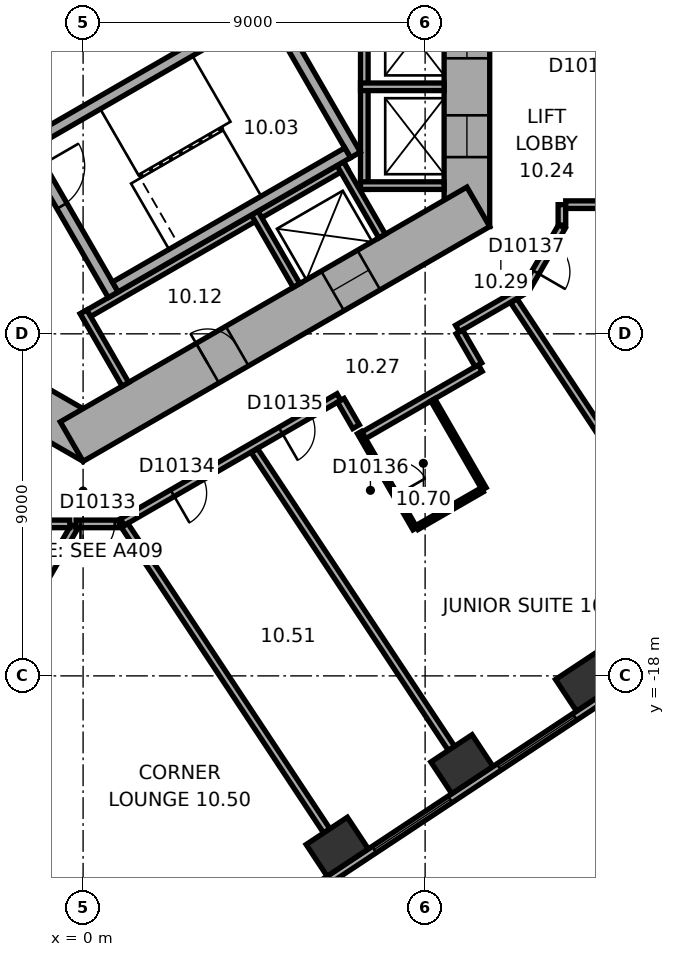
"""IFC4 building model, lengths in metres.
Left out: names, types, materials, properties, quantities, classifications, styles, units other than length and angle.
Written with IfcOpenShell. Run it as: python <this file> out.ifc"""

import sys

from ifc_helpers import new_model, si_unit, direction, frame, frame_2d, origin, origin_2d, place, context, subcontext, project, spatial, rectangle, extrude, element, fill, save


model = new_model("IFC4")
c1 = context("Model", 3, precision=1e-05, world=origin(), true_north=direction((0.0, 1.0)))
c2 = subcontext(c1, "Body", "Model", "MODEL_VIEW")
j1 = project(units=[si_unit("LENGTHUNIT", "METRE"), si_unit("PLANEANGLEUNIT", "RADIAN")], contexts=[c1])
p1 = place(None, origin())
s1 = spatial("IfcSite", under=j1, at=p1, CompositionType="ELEMENT")
p2 = place(p1, origin())
s2 = spatial("IfcBuilding", under=s1, at=p2, CompositionType="ELEMENT")
p3 = place(p2, frame((0.0, 0.0, 53.9)))
s3 = spatial("IfcBuildingStorey", under=s2, at=p3, CompositionType="ELEMENT", Elevation=53.9)
for number, where, z_axis, x_axis in (
    (1, (6.688, -22.496, 0.0), (0.0, 0.0, 1.0), (0.834, 0.552, 0.0)),
    (2, (9.969, -20.324, 0.0), (0.0, 0.0, 1.0), (0.834, 0.552, 0.0)),
    (3, (13.25, -18.152, 0.0), (0.0, 0.0, 1.0), (0.834, 0.552, 0.0)),
):
    element("IfcColumn", number, at=place(p3, frame(where, z_axis=z_axis, x_axis=x_axis)), inside=s3, PredefinedType="COLUMN", context=c2, shape_type="SweptSolid", body=[
        extrude(rectangle(XDim=1.3, YDim=1.0, at=origin_2d()), origin(), (0.0, 0.0, 1.0), 3.3),
    ])
p4 = place(p3, frame((10.1, -6.177, 0.0), z_axis=(0.0, 0.0, 1.0), x_axis=(0.0, 1.0, 0.0)))
e4 = element("IfcWall", 4, at=p4, inside=s3, PredefinedType="SHEAR", context=c2, shape_type="SweptSolid", body=[
    extrude(rectangle(XDim=12.355, YDim=1.2, at=frame_2d((6.177, 0.0))), origin(), (0.0, 0.0, 1.0), 3.3),
])
p5 = place(p4, frame((6.378, 0.0, 0.0)))
e5 = element("IfcOpeningElement", 5, at=p5, cuts=e4, PredefinedType="OPENING", context=c2, shape_type="SweptSolid", body=[
    extrude(rectangle(XDim=1.5, YDim=2.1, at=frame_2d((0.75, 1.05))), frame((0.0, 0.61, 0.0), z_axis=(0.0, -1.0, 0.0), x_axis=(1.0, 0.0, 0.0)), (0.0, 0.0, 1.0), 1.22),
])
p6 = place(p4, frame((1.828, 0.0, 0.0)))
e6 = element("IfcOpeningElement", 6, at=p6, cuts=e4, PredefinedType="OPENING", context=c2, shape_type="SweptSolid", body=[
    extrude(rectangle(XDim=1.1, YDim=2.1, at=frame_2d((0.55, 1.05))), frame((0.0, 0.61, 0.0), z_axis=(0.0, -1.0, 0.0), x_axis=(1.0, 0.0, 0.0)), (0.0, 0.0, 1.0), 1.22),
])
p7 = place(p4, frame((4.427, 0.0, 0.0)))
e7 = element("IfcOpeningElement", 7, at=p7, cuts=e4, PredefinedType="OPENING", context=c2, shape_type="SweptSolid", body=[
    extrude(rectangle(XDim=1.1, YDim=2.1, at=frame_2d((0.55, 1.05))), frame((0.0, 0.61, 0.0), z_axis=(0.0, -1.0, 0.0), x_axis=(1.0, 0.0, 0.0)), (0.0, 0.0, 1.0), 1.22),
])
p8 = place(p3, frame((-10.4, -5.658, 0.0), z_axis=(0.0, 0.0, 1.0), x_axis=(0.866021384402, -0.500006961711, 0.0)))
e8 = element("IfcWall", 8, at=p8, inside=s3, PredefinedType="SHEAR", context=c2, shape_type="SweptSolid", body=[
    extrude(rectangle(XDim=12.355, YDim=1.2, at=frame_2d((6.178, 0.0))), origin(), (0.0, 0.0, 1.0), 3.3),
])
p9 = place(p8, frame((6.378, 0.0, 0.0)))
e9 = element("IfcOpeningElement", 9, at=p9, cuts=e8, PredefinedType="OPENING", context=c2, shape_type="SweptSolid", body=[
    extrude(rectangle(XDim=1.5, YDim=2.1, at=frame_2d((0.75, 1.05))), frame((0.0, 0.61, 0.0), z_axis=(0.0, -1.0, 0.0), x_axis=(1.0, 0.0, 0.0)), (0.0, 0.0, 1.0), 1.22),
])
p10 = place(p8, frame((1.928, 0.0, 0.0)))
e10 = element("IfcOpeningElement", 10, at=p10, cuts=e8, PredefinedType="OPENING", context=c2, shape_type="SweptSolid", body=[
    extrude(rectangle(XDim=0.9, YDim=2.1, at=frame_2d((0.45, 1.05))), frame((0.0, 0.61, 0.0), z_axis=(0.0, -1.0, 0.0), x_axis=(1.0, 0.0, 0.0)), (0.0, 0.0, 1.0), 1.22),
])
p11 = place(p8, frame((4.528, 0.0, 0.0)))
e11 = element("IfcOpeningElement", 11, at=p11, cuts=e8, PredefinedType="OPENING", context=c2, shape_type="SweptSolid", body=[
    extrude(rectangle(XDim=0.9, YDim=2.1, at=frame_2d((0.45, 1.05))), frame((0.0, 0.61, 0.0), z_axis=(0.0, -1.0, 0.0), x_axis=(1.0, 0.0, 0.0)), (0.0, 0.0, 1.0), 1.22),
])
p12 = place(p3, frame((-0.3, -11.836, 0.0), z_axis=(0.0, 0.0, 1.0), x_axis=(0.866021384402, 0.500006961711, 0.0)))
e12 = element("IfcWall", 12, at=p12, inside=s3, PredefinedType="SHEAR", context=c2, shape_type="SweptSolid", body=[
    extrude(rectangle(XDim=12.355, YDim=1.2, at=frame_2d((6.178, 0.0))), origin(), (0.0, 0.0, 1.0), 3.3),
])
p13 = place(p12, frame((4.128, 0.0, 0.0)))
e13 = element("IfcOpeningElement", 13, at=p13, cuts=e12, PredefinedType="OPENING", context=c2, shape_type="SweptSolid", body=[
    extrude(rectangle(XDim=0.9, YDim=2.1, at=frame_2d((0.45, 1.05))), frame((0.0, 0.61, 0.0), z_axis=(0.0, -1.0, 0.0), x_axis=(1.0, 0.0, 0.0)), (0.0, 0.0, 1.0), 1.22),
])
p14 = place(p12, frame((7.928, 0.0, 0.0)))
e14 = element("IfcOpeningElement", 14, at=p14, cuts=e12, PredefinedType="OPENING", context=c2, shape_type="SweptSolid", body=[
    extrude(rectangle(XDim=1.1, YDim=2.1, at=frame_2d((0.55, 1.05))), frame((0.0, 0.61, 0.0), z_axis=(0.0, -1.0, 0.0), x_axis=(1.0, 0.0, 0.0)), (0.0, 0.0, 1.0), 1.22),
])
p15 = place(p3, frame((3.083, -25.601, 0.0), z_axis=(0.0, 0.0, 1.0), x_axis=(0.833884295743, 0.551939291329, 0.0)))
e15 = element("IfcWall", 15, at=p15, inside=s3, PredefinedType="STANDARD", context=c2, shape_type="SweptSolid", body=[
    extrude(rectangle(XDim=21.246, YDim=0.2, at=frame_2d((10.623, 0.0))), origin(), (0.0, 0.0, 1.0), 3.3),
])
p16 = place(p15, frame((1.553, 0.0, 0.8)))
e16 = element("IfcOpeningElement", 16, at=p16, cuts=e15, PredefinedType="OPENING", context=c2, shape_type="SweptSolid", body=[
    extrude(rectangle(XDim=2.4, YDim=1.7, at=frame_2d((1.2, 0.85))), frame((0.0, 0.11, 0.0), z_axis=(0.0, -1.0, 0.0), x_axis=(1.0, 0.0, 0.0)), (0.0, 0.0, 1.0), 0.22),
])
p17 = place(p15, frame((5.488, 0.0, 0.8)))
e17 = element("IfcOpeningElement", 17, at=p17, cuts=e15, PredefinedType="OPENING", context=c2, shape_type="SweptSolid", body=[
    extrude(rectangle(XDim=2.4, YDim=1.7, at=frame_2d((1.2, 0.85))), frame((0.0, 0.11, 0.0), z_axis=(0.0, -1.0, 0.0), x_axis=(1.0, 0.0, 0.0)), (0.0, 0.0, 1.0), 0.22),
])
p18 = place(p15, frame((9.422, 0.0, 0.8)))
e18 = element("IfcOpeningElement", 18, at=p18, cuts=e15, PredefinedType="OPENING", context=c2, shape_type="SweptSolid", body=[
    extrude(rectangle(XDim=2.4, YDim=1.7, at=frame_2d((1.2, 0.85))), frame((0.0, 0.11, 0.0), z_axis=(0.0, -1.0, 0.0), x_axis=(1.0, 0.0, 0.0)), (0.0, 0.0, 1.0), 0.22),
])
p19 = place(p15, frame((13.357, 0.0, 0.8)))
e19 = element("IfcOpeningElement", 19, at=p19, cuts=e15, PredefinedType="OPENING", context=c2, shape_type="SweptSolid", body=[
    extrude(rectangle(XDim=2.4, YDim=1.7, at=frame_2d((1.2, 0.85))), frame((0.0, 0.11, 0.0), z_axis=(0.0, -1.0, 0.0), x_axis=(1.0, 0.0, 0.0)), (0.0, 0.0, 1.0), 0.22),
])
p20 = place(p15, frame((17.291, 0.0, 0.8)))
e20 = element("IfcOpeningElement", 20, at=p20, cuts=e15, PredefinedType="OPENING", context=c2, shape_type="SweptSolid", body=[
    extrude(rectangle(XDim=2.4, YDim=1.7, at=frame_2d((1.2, 0.85))), frame((0.0, 0.11, 0.0), z_axis=(0.0, -1.0, 0.0), x_axis=(1.0, 0.0, 0.0)), (0.0, 0.0, 1.0), 0.22),
])
p21 = place(p3, frame((7.4, -5.2, 0.0), z_axis=(0.0, 0.0, 1.0), x_axis=(0.0, 1.0, 0.0)))
e21 = element("IfcWall", 21, at=p21, inside=s3, PredefinedType="PARTITIONING", context=c2, shape_type="SweptSolid", body=[
    extrude(rectangle(XDim=5.4, YDim=0.2, at=frame_2d((2.7, 0.0))), origin(), (0.0, 0.0, 1.0), 3.05),
])
for number, where, z_axis, x_axis in (
    (22, (7.3, -5.1, 0.0), (0.0, 0.0, 1.0), (1.0, 0.0, 0.0)),
    (23, (7.3, -2.5, 0.0), (0.0, 0.0, 1.0), (1.0, 0.0, 0.0)),
):
    element("IfcWall", number, at=place(p3, frame(where, z_axis=z_axis, x_axis=x_axis)), inside=s3, PredefinedType="PARTITIONING", context=c2, shape_type="SweptSolid", body=[
        extrude(rectangle(XDim=2.2, YDim=0.2, at=frame_2d((1.1, 0.0))), origin(), (0.0, 0.0, 1.0), 3.05),
    ])
p22 = place(p3, frame((-0.024, -8.559, 0.0), z_axis=(0.0, 0.0, 1.0), x_axis=(0.866026010844, 0.49999894854, 0.0)))
e24 = element("IfcWall", 24, at=p22, inside=s3, PredefinedType="PARTITIONING", context=c2, shape_type="SweptSolid", body=[
    extrude(rectangle(XDim=8.0, YDim=0.2, at=frame_2d((4.0, 0.0))), origin(), (0.0, 0.0, 1.0), 3.05),
])
for number, where, z_axis, x_axis in (
    (25, (0.013, -8.422, 0.0), (0.0, 0.0, 1.0), (0.5, -0.866, 0.0)),
    (26, (4.516, -5.822, 0.0), (0.0, 0.0, 1.0), (0.5, -0.866, 0.0)),
    (27, (6.768, -4.522, 0.0), (0.0, 0.0, 1.0), (0.5, -0.866, 0.0)),
):
    element("IfcWall", number, at=place(p3, frame(where, z_axis=z_axis, x_axis=x_axis)), inside=s3, PredefinedType="PARTITIONING", context=c2, shape_type="SweptSolid", body=[
        extrude(rectangle(XDim=2.2, YDim=0.2, at=frame_2d((1.1, 0.0))), origin(), (0.0, 0.0, 1.0), 3.05),
    ])
p23 = place(p3, frame((-1.558, -3.902, 0.0), z_axis=(0.0, 0.0, 1.0), x_axis=(0.499977259774, -0.866038532462, 0.0)))
e28 = element("IfcWall", 28, at=p23, inside=s3, PredefinedType="SHEAR", context=c2, shape_type="SweptSolid", body=[
    extrude(rectangle(XDim=4.7, YDim=0.3, at=frame_2d((2.35, 0.0))), origin(), (0.0, 0.0, 1.0), 3.05),
])
p24 = place(p23, frame((0.8, 0.0, 0.0)))
e29 = element("IfcOpeningElement", 29, at=p24, cuts=e28, PredefinedType="OPENING", context=c2, shape_type="SweptSolid", body=[
    extrude(rectangle(XDim=1.2, YDim=2.1, at=frame_2d((0.6, 1.05))), frame((0.0, 0.16, 0.0), z_axis=(0.0, -1.0, 0.0), x_axis=(1.0, 0.0, 0.0)), (0.0, 0.0, 1.0), 0.32),
])
p25 = place(p3, frame((4.816, -0.222, 0.0), z_axis=(0.0, 0.0, 1.0), x_axis=(0.499977259774, -0.866038532462, 0.0)))
e30 = element("IfcWall", 30, at=p25, inside=s3, PredefinedType="SHEAR", context=c2, shape_type="SweptSolid", body=[
    extrude(rectangle(XDim=4.7, YDim=0.3, at=frame_2d((2.35, 0.0))), origin(), (0.0, 0.0, 1.0), 3.05),
])
for number, where, z_axis, x_axis in (
    (31, (-1.353, -3.957, 0.0), (0.0, 0.0, 1.0), (0.866, 0.5, 0.0)),
    (32, (0.847, -7.767, 0.0), (0.0, 0.0, 1.0), (0.866, 0.5, 0.0)),
):
    element("IfcWall", number, at=place(p3, frame(where, z_axis=z_axis, x_axis=x_axis)), inside=s3, PredefinedType="SHEAR", context=c2, shape_type="SweptSolid", body=[
        extrude(rectangle(XDim=7.06, YDim=0.3, at=frame_2d((3.53, 0.0))), origin(), (0.0, 0.0, 1.0), 3.05),
    ])
p26 = place(p3, frame((-5.052, -22.429, 0.0), z_axis=(0.0, 0.0, 1.0), x_axis=(0.50000569793, 0.866022114058, 0.0)))
e33 = element("IfcWall", 33, at=p26, inside=s3, PredefinedType="PARTITIONING", context=c2, shape_type="SweptSolid", body=[
    extrude(rectangle(XDim=9.65, YDim=0.2, at=frame_2d((4.825, 0.0))), origin(), (0.0, 0.0, 1.0), 3.05),
])
p27 = place(p3, frame((-0.91, -14.001, 0.0), z_axis=(0.0, 0.0, 1.0), x_axis=(1.0, 0.0, 0.0)))
e34 = element("IfcWall", 34, at=p27, inside=s3, PredefinedType="PARTITIONING", context=c2, shape_type="SweptSolid", body=[
    extrude(rectangle(XDim=0.56, YDim=0.2, at=frame_2d((0.28, 0.0))), origin(), (0.0, 0.0, 1.0), 3.05),
])
p28 = place(p3, frame((-0.186, -14.001, 0.0), z_axis=(0.0, 0.0, 1.0), x_axis=(1.0, 0.0, 0.0)))
e35 = element("IfcWall", 35, at=p28, inside=s3, PredefinedType="PARTITIONING", context=c2, shape_type="SweptSolid", body=[
    extrude(rectangle(XDim=1.136, YDim=0.2, at=frame_2d((0.568, 0.0))), origin(), (0.0, 0.0, 1.0), 3.05),
])
p29 = place(p28, frame((0.118, 0.0, 0.0)))
e36 = element("IfcOpeningElement", 36, at=p29, cuts=e35, PredefinedType="OPENING", context=c2, shape_type="SweptSolid", body=[
    extrude(rectangle(XDim=0.9, YDim=2.1, at=frame_2d((0.45, 1.05))), frame((0.0, 0.11, 0.0), z_axis=(0.0, -1.0, 0.0), x_axis=(1.0, 0.0, 0.0)), (0.0, 0.0, 1.0), 0.22),
])
p30 = place(p3, frame((1.033, -13.953, 0.0), z_axis=(0.0, 0.0, 1.0), x_axis=(0.866017531406, 0.500013635111, 0.0)))
e37 = element("IfcWall", 37, at=p30, inside=s3, PredefinedType="PARTITIONING", context=c2, shape_type="SweptSolid", body=[
    extrude(rectangle(XDim=6.58, YDim=0.2, at=frame_2d((3.29, 0.0))), origin(), (0.0, 0.0, 1.0), 3.05),
])
p31 = place(p30, frame((1.521, 0.0, 0.0)))
e38 = element("IfcOpeningElement", 38, at=p31, cuts=e37, PredefinedType="OPENING", context=c2, shape_type="SweptSolid", body=[
    extrude(rectangle(XDim=0.9, YDim=2.1, at=frame_2d((0.45, 1.05))), frame((0.0, 0.11, 0.0), z_axis=(0.0, -1.0, 0.0), x_axis=(1.0, 0.0, 0.0)), (0.0, 0.0, 1.0), 0.22),
])
p32 = place(p30, frame((4.811, 0.0, 0.0)))
e39 = element("IfcOpeningElement", 39, at=p32, cuts=e37, PredefinedType="OPENING", context=c2, shape_type="SweptSolid", body=[
    extrude(rectangle(XDim=0.9, YDim=2.1, at=frame_2d((0.45, 1.05))), frame((0.0, 0.11, 0.0), z_axis=(0.0, -1.0, 0.0), x_axis=(1.0, 0.0, 0.0)), (0.0, 0.0, 1.0), 0.22),
])
p33 = place(p3, frame((6.412, -22.079, 0.0), z_axis=(0.0, 0.0, 1.0), x_axis=(-0.551919507115, 0.83389739037, 0.0)))
e40 = element("IfcWall", 40, at=p33, inside=s3, PredefinedType="PARTITIONING", context=c2, shape_type="SweptSolid", body=[
    extrude(rectangle(XDim=9.635, YDim=0.2, at=frame_2d((4.817, 0.0))), origin(), (0.0, 0.0, 1.0), 3.05),
])
p34 = place(p3, frame((6.782, -10.749, 0.0), z_axis=(0.0, 0.0, 1.0), x_axis=(0.500170954823, -0.865926680471, 0.0)))
e41 = element("IfcWall", 41, at=p34, inside=s3, PredefinedType="PARTITIONING", context=c2, shape_type="SweptSolid", body=[
    extrude(rectangle(XDim=0.801, YDim=0.2, at=frame_2d((0.4, 0.0))), origin(), (0.0, 0.0, 1.0), 3.05),
])
p35 = place(p3, frame((7.385, -11.673, 0.0), z_axis=(0.0, 0.0, 1.0), x_axis=(0.866037524642, 0.499979005472, 0.0)))
e42 = element("IfcWall", 42, at=p35, inside=s3, PredefinedType="PARTITIONING", context=c2, shape_type="SweptSolid", body=[
    extrude(rectangle(XDim=3.542, YDim=0.2, at=frame_2d((1.771, 0.0))), origin(), (0.0, 0.0, 1.0), 3.05),
])
p36 = place(p3, frame((8.733, -14.127, 0.0), z_axis=(0.0, 0.0, 1.0), x_axis=(-0.499978132246, 0.86603802877, 0.0)))
e43 = element("IfcWall", 43, at=p36, inside=s3, PredefinedType="PARTITIONING", context=c2, shape_type="SweptSolid", body=[
    extrude(rectangle(XDim=2.921, YDim=0.12, at=frame_2d((1.46, 0.0))), origin(), (0.0, 0.0, 1.0), 3.05),
])
p37 = place(p36, frame((1.01, 0.0, 0.0)))
e44 = element("IfcOpeningElement", 44, at=p37, cuts=e43, PredefinedType="OPENING", context=c2, shape_type="SweptSolid", body=[
    extrude(rectangle(XDim=0.9, YDim=2.1, at=frame_2d((0.45, 1.05))), frame((0.0, 0.07, 0.0), z_axis=(0.0, -1.0, 0.0), x_axis=(1.0, 0.0, 0.0)), (0.0, 0.0, 1.0), 0.14),
])
p38 = place(p3, frame((9.203, -10.738, 0.0), z_axis=(0.0, 0.0, 1.0), x_axis=(0.50000943426, -0.866019956843, 0.0)))
e45 = element("IfcWall", 45, at=p38, inside=s3, PredefinedType="PARTITIONING", context=c2, shape_type="SweptSolid", body=[
    extrude(rectangle(XDim=2.7, YDim=0.12, at=frame_2d((1.35, 0.0))), origin(), (0.0, 0.0, 1.0), 3.05),
])
p39 = place(p3, frame((9.693, -19.907, 0.0), z_axis=(0.0, 0.0, 1.0), x_axis=(-0.551938394837, 0.833884889121, 0.0)))
e46 = element("IfcWall", 46, at=p39, inside=s3, PredefinedType="PARTITIONING", context=c2, shape_type="SweptSolid", body=[
    extrude(rectangle(XDim=9.394, YDim=0.2, at=frame_2d((4.697, 0.0))), origin(), (0.0, 0.0, 1.0), 2.6),
])
p40 = place(p3, frame((9.852, -8.861, 0.0), z_axis=(0.0, 0.0, 1.0), x_axis=(0.866013291437, 0.500020978615, 0.0)))
e47 = element("IfcWall", 47, at=p40, inside=s3, PredefinedType="PARTITIONING", context=c2, shape_type="SweptSolid", body=[
    extrude(rectangle(XDim=2.077, YDim=0.2, at=frame_2d((1.038, 0.0))), origin(), (0.0, 0.0, 1.0), 3.05),
])
p41 = place(p3, frame((10.402, -9.815, 0.0), z_axis=(0.0, 0.0, 1.0), x_axis=(-0.499968756647, 0.866043441391, 0.0)))
e48 = element("IfcWall", 48, at=p41, inside=s3, PredefinedType="PARTITIONING", context=c2, shape_type="SweptSolid", body=[
    extrude(rectangle(XDim=1.001, YDim=0.2, at=frame_2d((0.5, 0.0))), origin(), (0.0, 0.0, 1.0), 3.05),
])
p42 = place(p3, frame((10.501, -13.106, 0.0), z_axis=(0.0, 0.0, 1.0), x_axis=(-0.866013262469, -0.500021028785, 0.0)))
e49 = element("IfcWall", 49, at=p42, inside=s3, PredefinedType="PARTITIONING", context=c2, shape_type="SweptSolid", body=[
    extrude(rectangle(XDim=1.982, YDim=0.12, at=frame_2d((0.991, 0.0))), origin(), (0.0, 0.0, 1.0), 3.05),
])
p43 = place(p3, frame((11.67, -7.788, 0.0), z_axis=(0.0, 0.0, 1.0), x_axis=(0.500063286585, 0.865988862174, 0.0)))
e50 = element("IfcWall", 50, at=p43, inside=s3, PredefinedType="PARTITIONING", context=c2, shape_type="SweptSolid", body=[
    extrude(rectangle(XDim=1.86, YDim=0.2, at=frame_2d((0.93, 0.0))), origin(), (0.0, 0.0, 1.0), 3.05),
])
p44 = place(p43, frame((0.48, 0.0, 0.0)))
e51 = element("IfcOpeningElement", 51, at=p44, cuts=e50, PredefinedType="OPENING", context=c2, shape_type="SweptSolid", body=[
    extrude(rectangle(XDim=0.9, YDim=2.1, at=frame_2d((0.45, 1.05))), frame((0.0, 0.11, 0.0), z_axis=(0.0, -1.0, 0.0), x_axis=(1.0, 0.0, 0.0)), (0.0, 0.0, 1.0), 0.22),
])
p45 = place(p3, frame((12.6, -6.138, 0.0), z_axis=(0.0, 0.0, 1.0), x_axis=(0.0, 1.0, 0.0)))
e52 = element("IfcWall", 52, at=p45, inside=s3, PredefinedType="PARTITIONING", context=c2, shape_type="SweptSolid", body=[
    extrude(rectangle(XDim=0.537, YDim=0.2, at=frame_2d((0.268, 0.0))), origin(), (0.0, 0.0, 1.0), 3.05),
])
p46 = place(p3, frame((12.7, -5.601, 0.0), z_axis=(0.0, 0.0, 1.0), x_axis=(1.0, 0.0, 0.0)))
e53 = element("IfcWall", 53, at=p46, inside=s3, PredefinedType="PARTITIONING", context=c2, shape_type="SweptSolid", body=[
    extrude(rectangle(XDim=1.101, YDim=0.2, at=frame_2d((0.551, 0.0))), origin(), (0.0, 0.0, 1.0), 3.05),
])
p47 = place(p3, frame((16.255, -15.564, 0.0), z_axis=(0.0, 0.0, 1.0), x_axis=(-0.55192208744, 0.833895682562, 0.0)))
e54 = element("IfcWall", 54, at=p47, inside=s3, PredefinedType="PARTITIONING", context=c2, shape_type="SweptSolid", body=[
    extrude(rectangle(XDim=8.913, YDim=0.2, at=frame_2d((4.457, 0.0))), origin(), (0.0, 0.0, 1.0), 2.6),
])
p48 = place(p17, origin())
e55 = element("IfcWindow", 55, at=p48, inside=s3, PartitioningType="SINGLE_PANEL", PredefinedType="WINDOW", context=c2, shape_type="SweptSolid", body=[
    extrude(rectangle(XDim=2.4, YDim=1.7, at=frame_2d((1.2, 0.85))), frame((0.0, 0.03, 0.0), z_axis=(0.0, -1.0, 0.0), x_axis=(1.0, 0.0, 0.0)), (0.0, 0.0, 1.0), 0.06),
])
fill(e17, e55)
p49 = place(p18, origin())
e56 = element("IfcWindow", 56, at=p49, inside=s3, PartitioningType="SINGLE_PANEL", PredefinedType="WINDOW", context=c2, shape_type="SweptSolid", body=[
    extrude(rectangle(XDim=2.4, YDim=1.7, at=frame_2d((1.2, 0.85))), frame((0.0, 0.03, 0.0), z_axis=(0.0, -1.0, 0.0), x_axis=(1.0, 0.0, 0.0)), (0.0, 0.0, 1.0), 0.06),
])
fill(e18, e56)
p50 = place(p24, origin())
e57 = element("IfcDoor", 57, at=p50, inside=s3, OperationType="SINGLE_SWING_RIGHT", PredefinedType="DOOR", context=c2, shape_type="SweptSolid", body=[
    extrude(rectangle(XDim=1.2, YDim=2.1, at=frame_2d((0.6, 1.05))), frame((0.0, 0.025, 0.0), z_axis=(0.0, -1.0, 0.0), x_axis=(1.0, 0.0, 0.0)), (0.0, 0.0, 1.0), 0.05),
])
fill(e29, e57)
p51 = place(p13, origin())
e58 = element("IfcDoor", 58, at=p51, inside=s3, OperationType="SINGLE_SWING_LEFT", PredefinedType="DOOR", context=c2, shape_type="SweptSolid", body=[
    extrude(rectangle(XDim=0.9, YDim=2.1, at=frame_2d((0.45, 1.05))), frame((0.0, 0.025, 0.0), z_axis=(0.0, -1.0, 0.0), x_axis=(1.0, 0.0, 0.0)), (0.0, 0.0, 1.0), 0.05),
])
fill(e13, e58)
p52 = place(p6, origin())
e59 = element("IfcDoor", 59, at=p52, inside=s3, OperationType="DOUBLE_DOOR_SLIDING", PredefinedType="DOOR", context=c2, shape_type="SweptSolid", body=[
    extrude(rectangle(XDim=1.1, YDim=2.1, at=frame_2d((0.55, 1.05))), frame((0.0, 0.025, 0.0), z_axis=(0.0, -1.0, 0.0), x_axis=(1.0, 0.0, 0.0)), (0.0, 0.0, 1.0), 0.05),
])
fill(e6, e59)
p53 = place(p7, origin())
e60 = element("IfcDoor", 60, at=p53, inside=s3, OperationType="DOUBLE_DOOR_SLIDING", PredefinedType="DOOR", context=c2, shape_type="SweptSolid", body=[
    extrude(rectangle(XDim=1.1, YDim=2.1, at=frame_2d((0.55, 1.05))), frame((0.0, 0.025, 0.0), z_axis=(0.0, -1.0, 0.0), x_axis=(1.0, 0.0, 0.0)), (0.0, 0.0, 1.0), 0.05),
])
fill(e7, e60)
p54 = place(p14, origin())
e61 = element("IfcDoor", 61, at=p54, inside=s3, OperationType="DOUBLE_DOOR_SLIDING", PredefinedType="DOOR", context=c2, shape_type="SweptSolid", body=[
    extrude(rectangle(XDim=1.1, YDim=2.1, at=frame_2d((0.55, 1.05))), frame((0.0, 0.025, 0.0), z_axis=(0.0, -1.0, 0.0), x_axis=(1.0, 0.0, 0.0)), (0.0, 0.0, 1.0), 0.05),
])
fill(e14, e61)
p55 = place(p29, origin())
e62 = element("IfcDoor", 62, at=p55, inside=s3, OperationType="SINGLE_SWING_LEFT", PredefinedType="DOOR", context=c2, shape_type="SweptSolid", body=[
    extrude(rectangle(XDim=0.9, YDim=2.1, at=frame_2d((0.45, 1.05))), frame((0.0, 0.025, 0.0), z_axis=(0.0, -1.0, 0.0), x_axis=(1.0, 0.0, 0.0)), (0.0, 0.0, 1.0), 0.05),
])
fill(e36, e62)
p56 = place(p31, origin())
e63 = element("IfcDoor", 63, at=p56, inside=s3, OperationType="SINGLE_SWING_LEFT", PredefinedType="DOOR", context=c2, shape_type="SweptSolid", body=[
    extrude(rectangle(XDim=0.9, YDim=2.1, at=frame_2d((0.45, 1.05))), frame((0.0, 0.025, 0.0), z_axis=(0.0, -1.0, 0.0), x_axis=(1.0, 0.0, 0.0)), (0.0, 0.0, 1.0), 0.05),
])
fill(e38, e63)
p57 = place(p32, origin())
e64 = element("IfcDoor", 64, at=p57, inside=s3, OperationType="SINGLE_SWING_LEFT", PredefinedType="DOOR", context=c2, shape_type="SweptSolid", body=[
    extrude(rectangle(XDim=0.9, YDim=2.1, at=frame_2d((0.45, 1.05))), frame((0.0, 0.025, 0.0), z_axis=(0.0, -1.0, 0.0), x_axis=(1.0, 0.0, 0.0)), (0.0, 0.0, 1.0), 0.05),
])
fill(e39, e64)
p58 = place(p37, origin())
e65 = element("IfcDoor", 65, at=p58, inside=s3, OperationType="SINGLE_SWING_LEFT", PredefinedType="DOOR", context=c2, shape_type="SweptSolid", body=[
    extrude(rectangle(XDim=0.9, YDim=2.1, at=frame_2d((0.45, 1.05))), frame((0.0, 0.025, 0.0), z_axis=(0.0, -1.0, 0.0), x_axis=(1.0, 0.0, 0.0)), (0.0, 0.0, 1.0), 0.05),
])
fill(e44, e65)
p59 = place(p44, origin())
e66 = element("IfcDoor", 66, at=p59, inside=s3, OperationType="SINGLE_SWING_LEFT", PredefinedType="DOOR", context=c2, shape_type="SweptSolid", body=[
    extrude(rectangle(XDim=0.9, YDim=2.1, at=frame_2d((0.45, 1.05))), frame((0.0, 0.025, 0.0), z_axis=(0.0, -1.0, 0.0), x_axis=(1.0, 0.0, 0.0)), (0.0, 0.0, 1.0), 0.05),
])
fill(e51, e66)
save(model, sys.argv[1])
